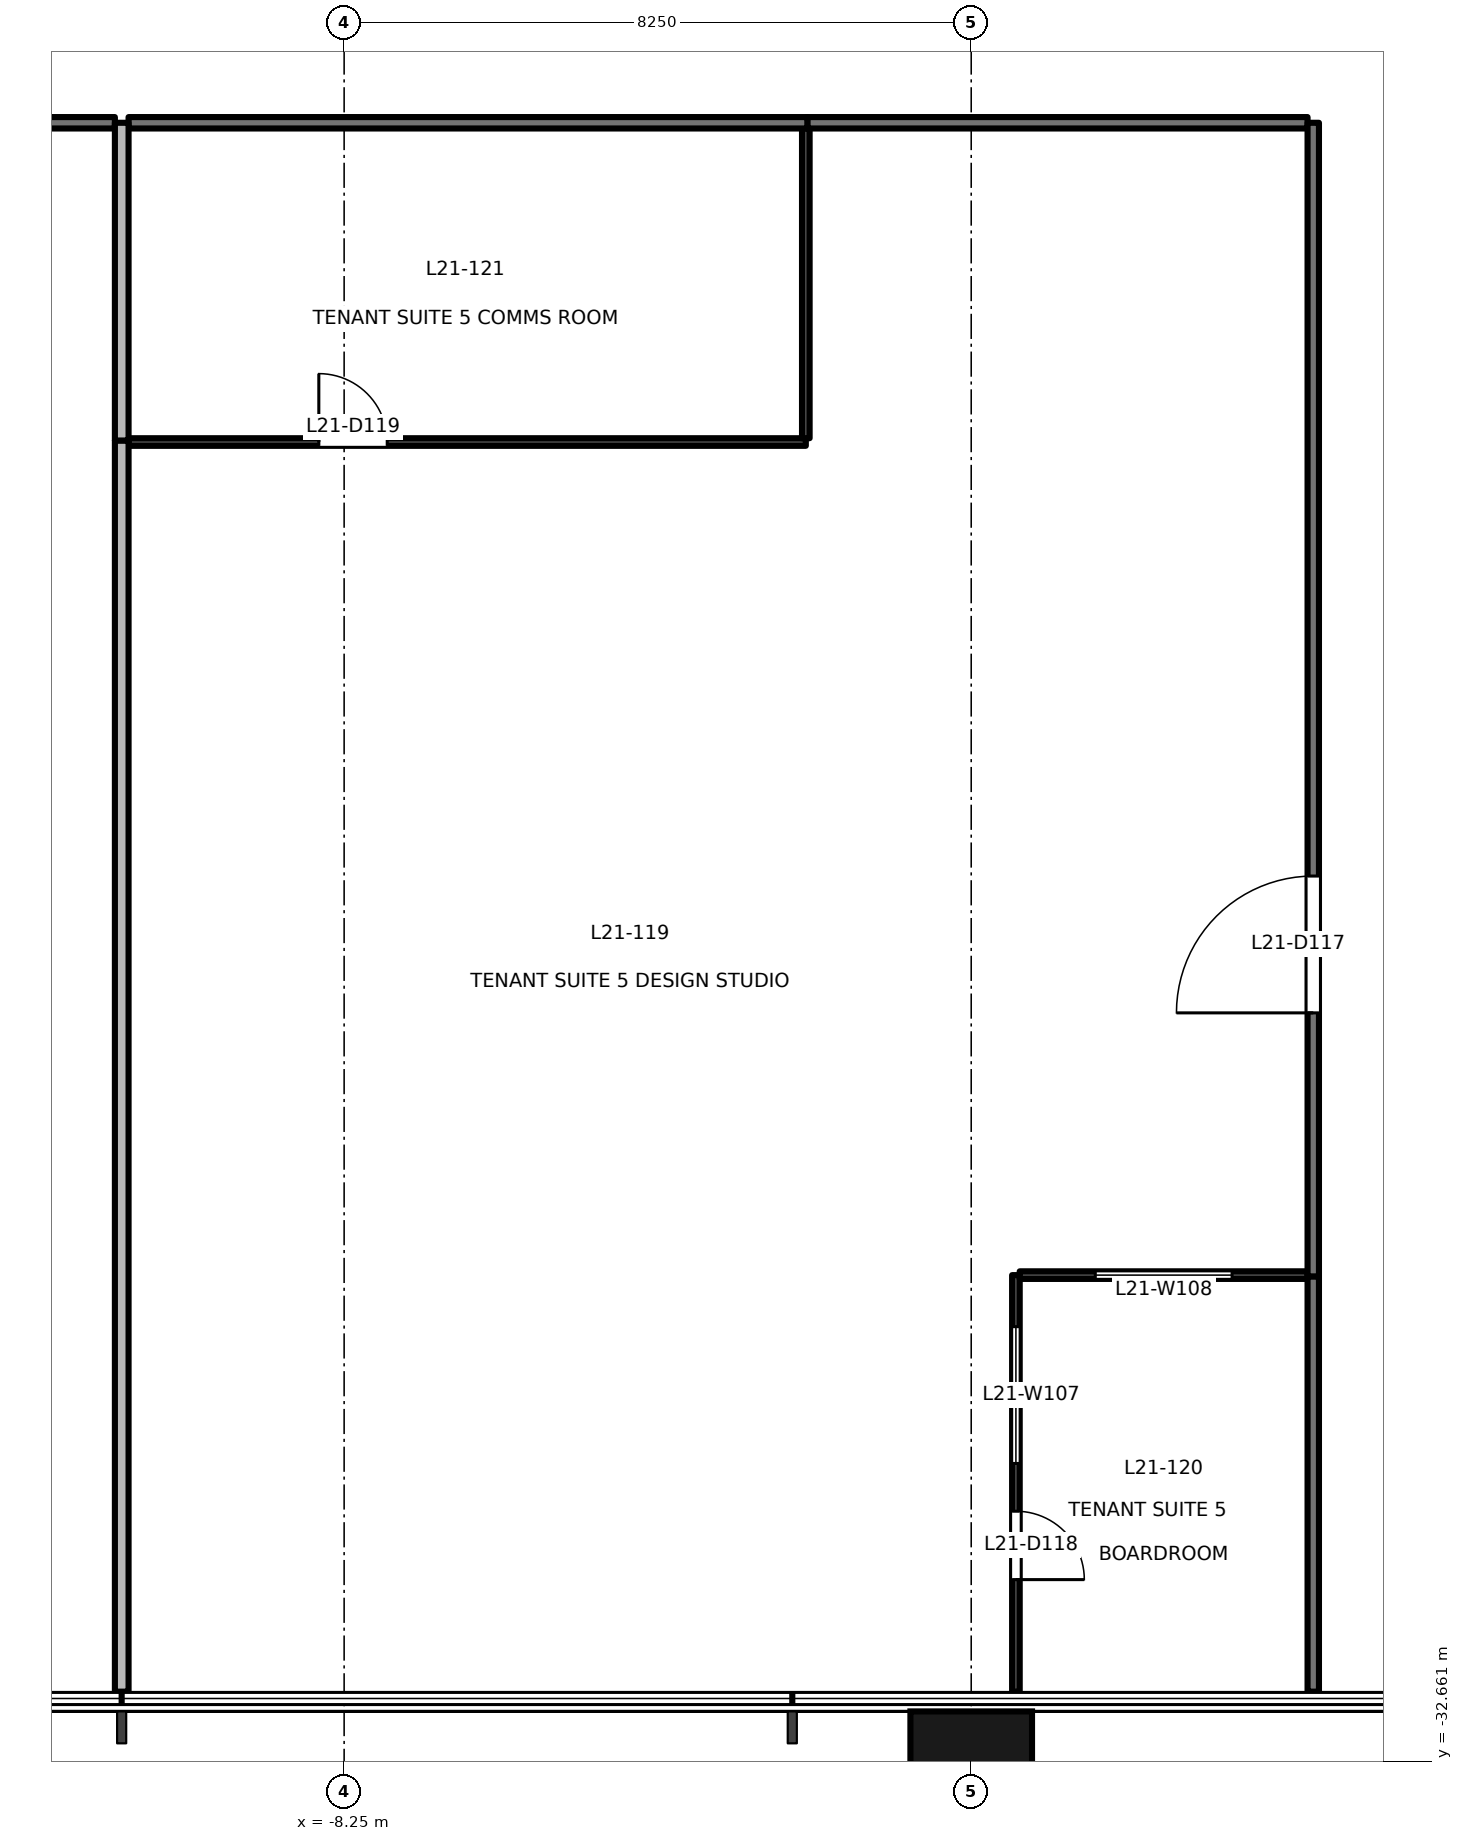
"""IFC4 building model, lengths in metres.
Left out: names, types, materials, properties, quantities, classifications, styles, units other than length and angle.
Written with IfcOpenShell. Run it as: python <this file> out.ifc"""

import sys

from ifc_helpers import new_model, si_unit, direction, frame, frame_2d, origin, origin_2d, place, context, subcontext, project, spatial, rectangle, extrude, element, fill, save


model = new_model("IFC4")
c1 = context("Model", 3, precision=1e-05, world=origin(), true_north=direction((0.0, 1.0)))
c2 = subcontext(c1, "Body", "Model", "MODEL_VIEW")
j1 = project(units=[si_unit("LENGTHUNIT", "METRE"), si_unit("PLANEANGLEUNIT", "RADIAN")], contexts=[c1])
p1 = place(None, origin())
s1 = spatial("IfcSite", under=j1, at=p1, CompositionType="ELEMENT")
p2 = place(p1, origin())
s2 = spatial("IfcBuilding", under=s1, at=p2, CompositionType="ELEMENT")
p3 = place(p2, frame((0.0, 0.0, 95.7)))
s3 = spatial("IfcBuildingStorey", under=s2, at=p3, CompositionType="ELEMENT", Elevation=95.7)
p4 = place(p3, frame((0.0, -32.9, -0.2), z_axis=(0.0, 0.0, 1.0), x_axis=(1.0, 0.0, 0.0)))
e1 = element("IfcColumn", 1, at=p4, inside=s3, PredefinedType="COLUMN", context=c2, shape_type="SweptSolid", body=[
    extrude(rectangle(XDim=1.6, YDim=1.8, at=origin_2d()), origin(), (0.0, 0.0, 1.0), 4.0),
])
p5 = place(p3, frame((-11.266, -11.1, 0.0), z_axis=(0.0, 0.0, 1.0), x_axis=(-1.0, 0.0, 0.0)))
e2 = element("IfcWall", 2, at=p5, inside=s3, PredefinedType="PARTITIONING", context=c2, shape_type="SweptSolid", body=[
    extrude(rectangle(XDim=3.79, YDim=0.15, at=frame_2d((1.895, 0.0))), origin(), (0.0, 0.0, 1.0), 2.8),
])
p6 = place(p5, frame((1.592, 0.0, 0.0)))
e3 = element("IfcOpeningElement", 3, at=p6, cuts=e2, PredefinedType="OPENING", context=c2, shape_type="SweptSolid", body=[
    extrude(rectangle(XDim=1.5, YDim=2.1, at=frame_2d((0.75, 1.05))), frame((0.0, 0.085, 0.0), z_axis=(0.0, -1.0, 0.0), x_axis=(1.0, 0.0, 0.0)), (0.0, 0.0, 1.0), 0.171),
])
p7 = place(p3, frame((4.425, -11.1, 0.0), z_axis=(0.0, 0.0, 1.0), x_axis=(-1.0, 0.0, 0.0)))
e4 = element("IfcWall", 4, at=p7, inside=s3, PredefinedType="PARTITIONING", context=c2, shape_type="SweptSolid", body=[
    extrude(rectangle(XDim=6.581, YDim=0.15, at=frame_2d((3.291, 0.0))), origin(), (0.0, 0.0, 1.0), 2.8),
])
p8 = place(p3, frame((4.5, -26.28, 0.0), z_axis=(0.0, 0.0, 1.0), x_axis=(0.0, 1.0, 0.0)))
e5 = element("IfcWall", 5, at=p8, inside=s3, PredefinedType="PARTITIONING", context=c2, shape_type="SweptSolid", body=[
    extrude(rectangle(XDim=15.18, YDim=0.15, at=frame_2d((7.59, 0.0))), origin(), (0.0, 0.0, 1.0), 2.8),
])
p9 = place(p8, frame((3.47, 0.0, 0.0)))
e6 = element("IfcOpeningElement", 6, at=p9, cuts=e5, PredefinedType="OPENING", context=c2, shape_type="SweptSolid", body=[
    extrude(rectangle(XDim=1.8, YDim=2.1, at=frame_2d((0.9, 1.05))), frame((0.0, 0.085, 0.0), z_axis=(0.0, -1.0, 0.0), x_axis=(1.0, 0.0, 0.0)), (0.0, 0.0, 1.0), 0.171),
])
p10 = place(p3, frame((4.5, -31.74, 0.0), z_axis=(0.0, 0.0, 1.0), x_axis=(0.0, 1.0, 0.0)))
e7 = element("IfcWall", 7, at=p10, inside=s3, PredefinedType="PARTITIONING", context=c2, shape_type="SweptSolid", body=[
    extrude(rectangle(XDim=5.46, YDim=0.15, at=frame_2d((2.73, 0.0))), origin(), (0.0, 0.0, 1.0), 2.8),
])
p11 = place(p3, frame((-2.156, -11.1, 0.0), z_axis=(0.0, 0.0, 1.0), x_axis=(-1.0, 0.0, 0.0)))
e8 = element("IfcWall", 8, at=p11, inside=s3, PredefinedType="PARTITIONING", context=c2, shape_type="SweptSolid", body=[
    extrude(rectangle(XDim=8.93, YDim=0.15, at=frame_2d((4.465, 0.0))), origin(), (0.0, 0.0, 1.0), 2.8),
])
p12 = place(p3, frame((-11.176, -15.28, 0.0), z_axis=(0.0, 0.0, 1.0), x_axis=(0.0, -1.0, 0.0)))
e9 = element("IfcWall", 9, at=p12, inside=s3, PredefinedType="PARTITIONING", context=c2, shape_type="SweptSolid", body=[
    extrude(rectangle(XDim=16.46, YDim=0.18, at=frame_2d((8.23, 0.0))), origin(), (0.0, 0.0, 1.0), 3.8),
])
p13 = place(p3, frame((-11.176, -11.1, 0.0), z_axis=(0.0, 0.0, 1.0), x_axis=(0.0, -1.0, 0.0)))
e10 = element("IfcWall", 10, at=p13, inside=s3, PredefinedType="PARTITIONING", context=c2, shape_type="SweptSolid", body=[
    extrude(rectangle(XDim=4.18, YDim=0.18, at=frame_2d((2.09, 0.0))), origin(), (0.0, 0.0, 1.0), 3.8),
])
p14 = place(p3, frame((0.588, -26.26, 0.0), z_axis=(0.0, 0.0, 1.0), x_axis=(0.0, -1.0, 0.0)))
e11 = element("IfcWall", 11, at=p14, inside=s3, PredefinedType="PARTITIONING", context=c2, shape_type="SweptSolid", body=[
    extrude(rectangle(XDim=5.48, YDim=0.1, at=frame_2d((2.74, 0.0))), origin(), (0.0, 0.0, 1.0), 3.8),
])
p15 = place(p14, frame((3.106, 0.0, 0.0)))
e12 = element("IfcOpeningElement", 12, at=p15, cuts=e11, PredefinedType="OPENING", context=c2, shape_type="SweptSolid", body=[
    extrude(rectangle(XDim=0.9, YDim=2.1, at=frame_2d((0.45, 1.05))), frame((0.0, 0.061, 0.0), z_axis=(0.0, -1.0, 0.0), x_axis=(1.0, 0.0, 0.0)), (0.0, 0.0, 1.0), 0.121),
])
p16 = place(p14, frame((0.678, 0.0, 0.9)))
e13 = element("IfcOpeningElement", 13, at=p16, cuts=e11, PredefinedType="OPENING", context=c2, shape_type="SweptSolid", body=[
    extrude(rectangle(XDim=1.8, YDim=1.2, at=frame_2d((0.9, 0.6))), frame((0.0, 0.061, 0.0), z_axis=(0.0, -1.0, 0.0), x_axis=(1.0, 0.0, 0.0)), (0.0, 0.0, 1.0), 0.121),
])
p17 = place(p3, frame((4.425, -26.26, 0.0), z_axis=(0.0, 0.0, 1.0), x_axis=(-1.0, 0.0, 0.0)))
e14 = element("IfcWall", 14, at=p17, inside=s3, PredefinedType="PARTITIONING", context=c2, shape_type="SweptSolid", body=[
    extrude(rectangle(XDim=3.787, YDim=0.1, at=frame_2d((1.894, 0.0))), origin(), (0.0, 0.0, 1.0), 2.8),
])
p18 = place(p17, frame((0.993, 0.0, 0.9)))
e15 = element("IfcOpeningElement", 15, at=p18, cuts=e14, PredefinedType="OPENING", context=c2, shape_type="SweptSolid", body=[
    extrude(rectangle(XDim=1.8, YDim=1.2, at=frame_2d((0.9, 0.6))), frame((0.0, 0.061, 0.0), z_axis=(0.0, -1.0, 0.0), x_axis=(1.0, 0.0, 0.0)), (0.0, 0.0, 1.0), 0.121),
])
p19 = place(p3, frame((-11.086, -15.3, 0.0), z_axis=(0.0, 0.0, 1.0), x_axis=(1.0, 0.0, 0.0)))
e16 = element("IfcWall", 16, at=p19, inside=s3, PredefinedType="PARTITIONING", context=c2, shape_type="SweptSolid", body=[
    extrude(rectangle(XDim=8.91, YDim=0.1, at=frame_2d((4.455, 0.0))), origin(), (0.0, 0.0, 1.0), 2.8),
])
p20 = place(p19, frame((2.503, 0.0, 0.0)))
e17 = element("IfcOpeningElement", 17, at=p20, cuts=e16, PredefinedType="OPENING", context=c2, shape_type="SweptSolid", body=[
    extrude(rectangle(XDim=0.9, YDim=2.1, at=frame_2d((0.45, 1.05))), frame((0.0, 0.061, 0.0), z_axis=(0.0, -1.0, 0.0), x_axis=(1.0, 0.0, 0.0)), (0.0, 0.0, 1.0), 0.121),
])
p21 = place(p3, frame((-2.176, -15.25, 0.0), z_axis=(0.0, 0.0, 1.0), x_axis=(0.0, 1.0, 0.0)))
e18 = element("IfcWall", 18, at=p21, inside=s3, PredefinedType="PARTITIONING", context=c2, shape_type="SweptSolid", body=[
    extrude(rectangle(XDim=4.075, YDim=0.1, at=frame_2d((2.038, 0.0))), origin(), (0.0, 0.0, 1.0), 3.8),
])
p22 = place(p9, origin())
e19 = element("IfcDoor", 19, at=p22, inside=s3, OperationType="DOUBLE_DOOR_SINGLE_SWING", PredefinedType="DOOR", context=c2, shape_type="SweptSolid", body=[
    extrude(rectangle(XDim=1.8, YDim=2.1, at=frame_2d((0.9, 1.05))), frame((0.0, 0.025, 0.0), z_axis=(0.0, -1.0, 0.0), x_axis=(1.0, 0.0, 0.0)), (0.0, 0.0, 1.0), 0.05),
])
fill(e6, e19)
p23 = place(p15, origin())
e20 = element("IfcDoor", 20, at=p23, inside=s3, OperationType="SINGLE_SWING_RIGHT", PredefinedType="DOOR", context=c2, shape_type="SweptSolid", body=[
    extrude(rectangle(XDim=0.9, YDim=2.1, at=frame_2d((0.45, 1.05))), frame((0.0, 0.025, 0.0), z_axis=(0.0, -1.0, 0.0), x_axis=(1.0, 0.0, 0.0)), (0.0, 0.0, 1.0), 0.05),
])
fill(e12, e20)
p24 = place(p20, origin())
e21 = element("IfcDoor", 21, at=p24, inside=s3, OperationType="SINGLE_SWING_LEFT", PredefinedType="DOOR", context=c2, shape_type="SweptSolid", body=[
    extrude(rectangle(XDim=0.9, YDim=2.1, at=frame_2d((0.45, 1.05))), frame((0.0, 0.025, 0.0), z_axis=(0.0, -1.0, 0.0), x_axis=(1.0, 0.0, 0.0)), (0.0, 0.0, 1.0), 0.05),
])
fill(e17, e21)
p25 = place(p16, origin())
e22 = element("IfcWindow", 22, at=p25, inside=s3, PartitioningType="SINGLE_PANEL", PredefinedType="WINDOW", context=c2, shape_type="SweptSolid", body=[
    extrude(rectangle(XDim=1.8, YDim=1.2, at=frame_2d((0.9, 0.6))), frame((0.0, 0.03, 0.0), z_axis=(0.0, -1.0, 0.0), x_axis=(1.0, 0.0, 0.0)), (0.0, 0.0, 1.0), 0.06),
])
fill(e13, e22)
p26 = place(p18, origin())
e23 = element("IfcWindow", 23, at=p26, inside=s3, PartitioningType="SINGLE_PANEL", PredefinedType="WINDOW", context=c2, shape_type="SweptSolid", body=[
    extrude(rectangle(XDim=1.8, YDim=1.2, at=frame_2d((0.9, 0.6))), frame((0.0, 0.03, 0.0), z_axis=(0.0, -1.0, 0.0), x_axis=(1.0, 0.0, 0.0)), (0.0, 0.0, 1.0), 0.06),
])
fill(e15, e23)
save(model, sys.argv[1])
